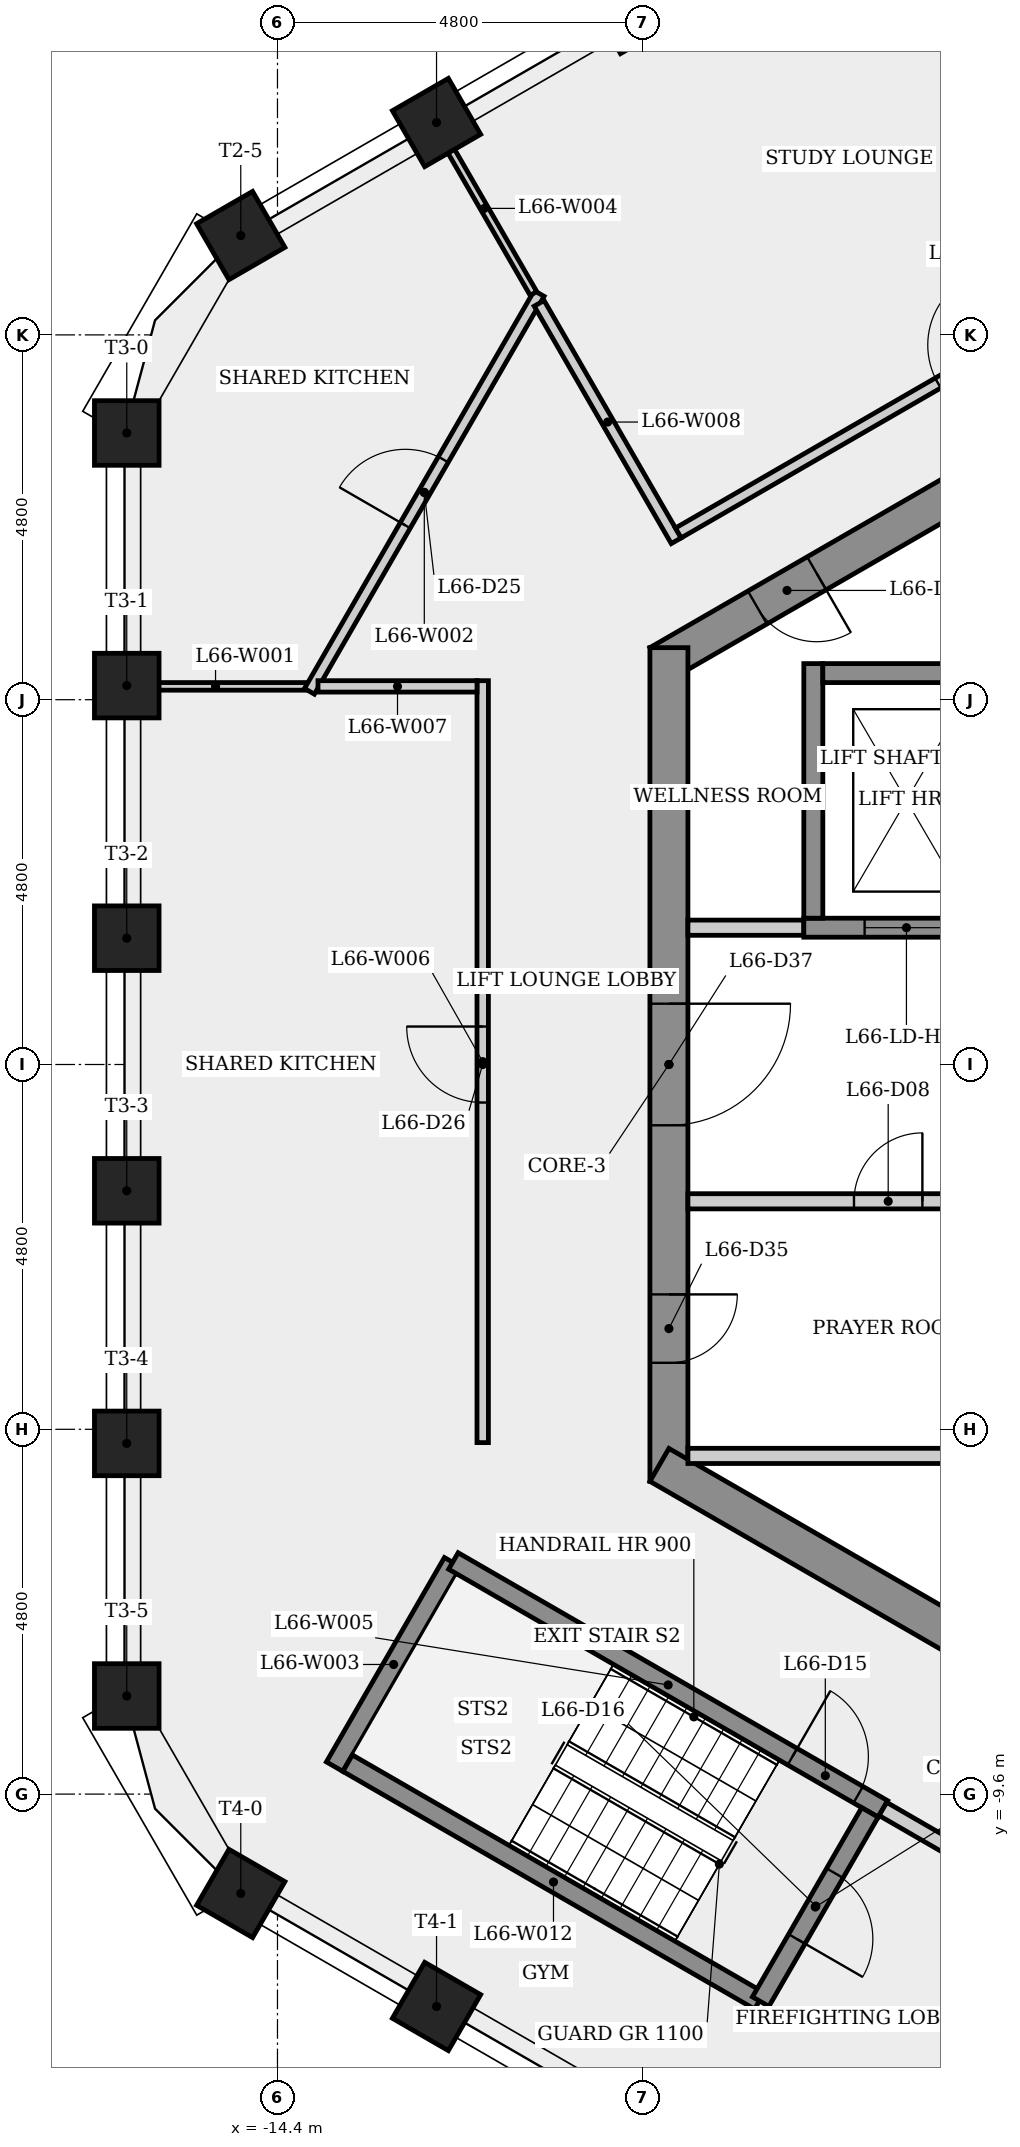
"""IFC4 building model, lengths in metres.
Left out: names, types, materials, properties, quantities, classifications, styles, units other than length and angle.
Written with IfcOpenShell. Run it as: python <this file> out.ifc"""

import sys

from ifc_helpers import new_model, si_unit, direction, frame, frame_2d, origin, origin_2d, place, context, subcontext, project, spatial, rectangle, extrude, element, fill, save


model = new_model("IFC4")
c1 = context("Model", 3, precision=1e-05, world=origin(), true_north=direction((0.0, 1.0)))
c2 = subcontext(c1, "Body", "Model", "MODEL_VIEW")
j1 = project(units=[si_unit("LENGTHUNIT", "METRE"), si_unit("PLANEANGLEUNIT", "RADIAN")], contexts=[c1])
p1 = place(None, origin())
s1 = spatial("IfcSite", under=j1, at=p1, CompositionType="ELEMENT")
p2 = place(p1, origin())
s2 = spatial("IfcBuilding", under=s1, at=p2, CompositionType="ELEMENT")
p3 = place(p2, frame((0.0, 0.0, 246.1)))
s3 = spatial("IfcBuildingStorey", under=s2, at=p3, CompositionType="ELEMENT", Elevation=246.1)
p4 = place(p3, frame((0.125, 10.753, 0.0), z_axis=(0.0, 0.0, 1.0), x_axis=(-0.866023993627, -0.500002442456, 0.0)))
e1 = element("IfcWall", 1, at=p4, inside=s3, PredefinedType="SHEAR", context=c2, shape_type="SweptSolid", body=[
    extrude(rectangle(XDim=10.97, YDim=0.5, at=frame_2d((5.485, 0.0))), origin(), (0.0, 0.0, 1.0), 3.4),
])
p5 = place(p4, frame((8.581, 0.0, 0.0)))
e2 = element("IfcOpeningElement", 2, at=p5, cuts=e1, PredefinedType="OPENING", context=c2, shape_type="SweptSolid", body=[
    extrude(rectangle(XDim=0.9, YDim=2.1, at=frame_2d((0.45, 1.05))), frame((0.0, 0.26, 0.0), z_axis=(0.0, -1.0, 0.0), x_axis=(1.0, 0.0, 0.0)), (0.0, 0.0, 1.0), 0.52),
])
p6 = place(p4, frame((1.687, 0.0, 0.0)))
e3 = element("IfcOpeningElement", 3, at=p6, cuts=e1, PredefinedType="OPENING", context=c2, shape_type="SweptSolid", body=[
    extrude(rectangle(XDim=0.9, YDim=2.1, at=frame_2d((0.45, 1.05))), frame((0.0, 0.26, 0.0), z_axis=(0.0, -1.0, 0.0), x_axis=(1.0, 0.0, 0.0)), (0.0, 0.0, 1.0), 0.52),
])
p7 = place(p3, frame((-9.25, 5.485, 0.0), z_axis=(0.0, 0.0, 1.0), x_axis=(0.0, -1.0, 0.0)))
e4 = element("IfcWall", 4, at=p7, inside=s3, PredefinedType="SHEAR", context=c2, shape_type="SweptSolid", body=[
    extrude(rectangle(XDim=10.97, YDim=0.5, at=frame_2d((5.485, 0.0))), origin(), (0.0, 0.0, 1.0), 3.4),
])
p8 = place(p7, frame((8.51, 0.0, 0.0)))
e5 = element("IfcOpeningElement", 5, at=p8, cuts=e4, PredefinedType="OPENING", context=c2, shape_type="SweptSolid", body=[
    extrude(rectangle(XDim=0.9, YDim=2.1, at=frame_2d((0.45, 1.05))), frame((0.0, 0.26, 0.0), z_axis=(0.0, -1.0, 0.0), x_axis=(1.0, 0.0, 0.0)), (0.0, 0.0, 1.0), 0.52),
])
p9 = place(p7, frame((4.685, 0.0, 0.0)))
e6 = element("IfcOpeningElement", 6, at=p9, cuts=e4, PredefinedType="OPENING", context=c2, shape_type="SweptSolid", body=[
    extrude(rectangle(XDim=1.6, YDim=2.1, at=frame_2d((0.8, 1.05))), frame((0.0, 0.26, 0.0), z_axis=(0.0, -1.0, 0.0), x_axis=(1.0, 0.0, 0.0)), (0.0, 0.0, 1.0), 0.52),
])
p10 = place(p3, frame((-9.375, -5.268, 0.0), z_axis=(0.0, 0.0, 1.0), x_axis=(0.866023993627, -0.500002442456, 0.0)))
e7 = element("IfcWall", 7, at=p10, inside=s3, PredefinedType="SHEAR", context=c2, shape_type="SweptSolid", body=[
    extrude(rectangle(XDim=10.97, YDim=0.5, at=frame_2d((5.485, 0.0))), origin(), (0.0, 0.0, 1.0), 3.4),
])
p11 = place(p10, frame((5.011, 0.0, 0.0)))
e8 = element("IfcOpeningElement", 8, at=p11, cuts=e7, PredefinedType="OPENING", context=c2, shape_type="SweptSolid", body=[
    extrude(rectangle(XDim=0.9, YDim=2.1, at=frame_2d((0.45, 1.05))), frame((0.0, 0.26, 0.0), z_axis=(0.0, -1.0, 0.0), x_axis=(1.0, 0.0, 0.0)), (0.0, 0.0, 1.0), 0.52),
])
for number, where, z_axis, x_axis in (
    (9, (-9.732, 13.881, 0.0), (0.0, 0.0, 1.0), (-0.5, 0.866, 0.0)),
    (10, (-12.307, 12.394, 0.0), (0.0, 0.0, 1.0), (-0.5, 0.866, 0.0)),
    (11, (-14.883, 10.907, 0.0), (0.0, 0.0, 1.0), (-0.5, 0.866, 0.0)),
    (12, (-16.383, 8.309, 0.0), (0.0, 0.0, 1.0), (-1.0, 0.0, 0.0)),
    (13, (-16.383, 4.986, 0.0), (0.0, 0.0, 1.0), (-1.0, 0.0, 0.0)),
    (14, (-16.383, 1.662, 0.0), (0.0, 0.0, 1.0), (-1.0, 0.0, 0.0)),
    (15, (-16.383, -1.662, 0.0), (0.0, 0.0, 1.0), (-1.0, 0.0, 0.0)),
    (16, (-16.383, -4.986, 0.0), (0.0, 0.0, 1.0), (-1.0, 0.0, 0.0)),
    (17, (-16.383, -8.309, 0.0), (0.0, 0.0, 1.0), (-1.0, 0.0, 0.0)),
    (18, (-14.883, -10.907, 0.0), (0.0, 0.0, 1.0), (-0.5, -0.866, 0.0)),
    (19, (-12.307, -12.394, 0.0), (0.0, 0.0, 1.0), (-0.5, -0.866, 0.0)),
):
    element("IfcColumn", number, at=place(p3, frame(where, z_axis=z_axis, x_axis=x_axis)), inside=s3, PredefinedType="COLUMN", context=c2, shape_type="SweptSolid", body=[
        extrude(rectangle(XDim=0.85, YDim=0.85, at=origin_2d()), origin(), (0.0, 0.0, 1.0), 3.4),
    ])
p12 = place(p3, frame((-14.017, 4.975, 0.0), z_axis=(0.0, 0.0, 1.0), x_axis=(-1.0, 0.0, 0.0)))
e20 = element("IfcWall", 20, at=p12, inside=s3, PredefinedType="PARTITIONING", context=c2, shape_type="SweptSolid", body=[
    extrude(rectangle(XDim=2.396, YDim=0.1, at=frame_2d((1.198, 0.0))), origin(), (0.0, 0.0, 1.0), 3.05),
])
p13 = place(p3, frame((-13.979, 4.91, 0.0), z_axis=(0.0, 0.0, 1.0), x_axis=(0.500000995992, 0.866024828747, 0.0)))
e21 = element("IfcWall", 21, at=p13, inside=s3, PredefinedType="PARTITIONING", context=c2, shape_type="SweptSolid", body=[
    extrude(rectangle(XDim=6.044, YDim=0.15, at=frame_2d((3.022, 0.0))), origin(), (0.0, 0.0, 1.0), 3.05),
])
p14 = place(p13, frame((2.522, 0.0, 0.0)))
e22 = element("IfcOpeningElement", 22, at=p14, cuts=e21, PredefinedType="OPENING", context=c2, shape_type="SweptSolid", body=[
    extrude(rectangle(XDim=1.0, YDim=2.1, at=frame_2d((0.5, 1.05))), frame((0.0, 0.085, 0.0), z_axis=(0.0, -1.0, 0.0), x_axis=(1.0, 0.0, 0.0)), (0.0, 0.0, 1.0), 0.17),
])
p15 = place(p3, frame((-13.648, -9.239, 0.0), z_axis=(0.0, 0.0, 1.0), x_axis=(0.500003782172, 0.866023220135, 0.0)))
e23 = element("IfcWall", 23, at=p15, inside=s3, PredefinedType="SHEAR", context=c2, shape_type="SweptSolid", body=[
    extrude(rectangle(XDim=3.105, YDim=0.25, at=frame_2d((1.552, 0.0))), origin(), (0.0, 0.0, 1.0), 3.05),
])
p16 = place(p3, frame((-12.325, 12.384, 0.0), z_axis=(0.0, 0.0, 1.0), x_axis=(0.500079363871, -0.865979578183, 0.0)))
e24 = element("IfcWall", 24, at=p16, inside=s3, PredefinedType="PARTITIONING", context=c2, shape_type="SweptSolid", body=[
    extrude(rectangle(XDim=2.585, YDim=0.1, at=frame_2d((1.293, 0.0))), origin(), (0.0, 0.0, 1.0), 3.05),
])
p17 = place(p3, frame((-12.085, -6.532, 0.0), z_axis=(0.0, 0.0, 1.0), x_axis=(0.866031063448, -0.499990197047, 0.0)))
e25 = element("IfcWall", 25, at=p17, inside=s3, PredefinedType="SHEAR", context=c2, shape_type="SweptSolid", body=[
    extrude(rectangle(XDim=6.525, YDim=0.25, at=frame_2d((3.263, 0.0))), origin(), (0.0, 0.0, 1.0), 3.05),
])
p18 = place(p17, frame((5.15, 0.0, 0.0)))
e26 = element("IfcOpeningElement", 26, at=p18, cuts=e25, PredefinedType="OPENING", context=c2, shape_type="SweptSolid", body=[
    extrude(rectangle(XDim=1.0, YDim=2.1, at=frame_2d((0.5, 1.05))), frame((0.0, 0.135, 0.0), z_axis=(0.0, -1.0, 0.0), x_axis=(1.0, 0.0, 0.0)), (0.0, 0.0, 1.0), 0.27),
])
p19 = place(p3, frame((-11.7, -4.975, 0.0), z_axis=(0.0, 0.0, 1.0), x_axis=(0.0, 1.0, 0.0)))
e27 = element("IfcWall", 27, at=p19, inside=s3, PredefinedType="PARTITIONING", context=c2, shape_type="SweptSolid", body=[
    extrude(rectangle(XDim=10.025, YDim=0.15, at=frame_2d((5.013, 0.0))), origin(), (0.0, 0.0, 1.0), 3.05),
])
p20 = place(p19, frame((4.475, 0.0, 0.0)))
e28 = element("IfcOpeningElement", 28, at=p20, cuts=e27, PredefinedType="OPENING", context=c2, shape_type="SweptSolid", body=[
    extrude(rectangle(XDim=1.0, YDim=2.1, at=frame_2d((0.5, 1.05))), frame((0.0, 0.085, 0.0), z_axis=(0.0, -1.0, 0.0), x_axis=(1.0, 0.0, 0.0)), (0.0, 0.0, 1.0), 0.17),
])
p21 = place(p3, frame((-11.775, 4.975, 0.0), z_axis=(0.0, 0.0, 1.0), x_axis=(-1.0, 0.0, 0.0)))
e29 = element("IfcWall", 29, at=p21, inside=s3, PredefinedType="PARTITIONING", context=c2, shape_type="SweptSolid", body=[
    extrude(rectangle(XDim=2.092, YDim=0.15, at=frame_2d((1.046, 0.0))), origin(), (0.0, 0.0, 1.0), 3.05),
])
p22 = place(p3, frame((-10.957, 10.015, 0.0), z_axis=(0.0, 0.0, 1.0), x_axis=(0.500019324569, -0.866014246452, 0.0)))
e30 = element("IfcWall", 30, at=p22, inside=s3, PredefinedType="PARTITIONING", context=c2, shape_type="SweptSolid", body=[
    extrude(rectangle(XDim=3.607, YDim=0.15, at=frame_2d((1.803, 0.0))), origin(), (0.0, 0.0, 1.0), 3.05),
])
p23 = place(p3, frame((-9.126, 6.994, 0.0), z_axis=(0.0, 0.0, 1.0), x_axis=(0.866030533695, 0.499991114629, 0.0)))
e31 = element("IfcWall", 31, at=p23, inside=s3, PredefinedType="PARTITIONING", context=c2, shape_type="SweptSolid", body=[
    extrude(rectangle(XDim=8.889, YDim=0.15, at=frame_2d((4.444, 0.0))), origin(), (0.0, 0.0, 1.0), 3.05),
])
p24 = place(p23, frame((3.944, 0.0, 0.0)))
e32 = element("IfcOpeningElement", 32, at=p24, cuts=e31, PredefinedType="OPENING", context=c2, shape_type="SweptSolid", body=[
    extrude(rectangle(XDim=1.0, YDim=2.1, at=frame_2d((0.5, 1.05))), frame((0.0, 0.085, 0.0), z_axis=(0.0, -1.0, 0.0), x_axis=(1.0, 0.0, 0.0)), (0.0, 0.0, 1.0), 0.17),
])
p25 = place(p3, frame((-9.0, 1.8, 0.0), z_axis=(0.0, 0.0, 1.0), x_axis=(1.0, 0.0, 0.0)))
e33 = element("IfcWall", 33, at=p25, inside=s3, PredefinedType="PARTITIONING", context=c2, shape_type="SweptSolid", body=[
    extrude(rectangle(XDim=1.525, YDim=0.2, at=frame_2d((0.763, 0.0))), origin(), (0.0, 0.0, 1.0), 3.05),
])
p26 = place(p3, frame((-9.0, -5.15, 0.0), z_axis=(0.0, 0.0, 1.0), x_axis=(1.0, 0.0, 0.0)))
e34 = element("IfcWall", 34, at=p26, inside=s3, PredefinedType="PARTITIONING", context=c2, shape_type="SweptSolid", body=[
    extrude(rectangle(XDim=11.325, YDim=0.2, at=frame_2d((5.663, 0.0))), origin(), (0.0, 0.0, 1.0), 3.05),
])
p27 = place(p3, frame((-8.06, -12.321, 0.0), z_axis=(0.0, 0.0, 1.0), x_axis=(-0.866029591389, 0.499992746786, 0.0)))
e35 = element("IfcWall", 35, at=p27, inside=s3, PredefinedType="SHEAR", context=c2, shape_type="SweptSolid", body=[
    extrude(rectangle(XDim=6.255, YDim=0.25, at=frame_2d((3.127, 0.0))), origin(), (0.0, 0.0, 1.0), 3.05),
])
p28 = place(p3, frame((-7.475, 1.8, 0.0), z_axis=(0.0, 0.0, 1.0), x_axis=(1.0, 0.0, 0.0)))
e36 = element("IfcWall", 36, at=p28, inside=s3, PredefinedType="SHEAR", context=c2, shape_type="SweptSolid", body=[
    extrude(rectangle(XDim=14.95, YDim=0.25, at=frame_2d((7.475, 0.0))), origin(), (0.0, 0.0, 1.0), 3.05),
])
p29 = place(p28, frame((0.8, 0.0, 0.0)))
e37 = element("IfcOpeningElement", 37, at=p29, cuts=e36, PredefinedType="OPENING", context=c2, shape_type="SweptSolid", body=[
    extrude(rectangle(XDim=1.1, YDim=2.1, at=frame_2d((0.55, 1.05))), frame((0.0, 0.135, 0.0), z_axis=(0.0, -1.0, 0.0), x_axis=(1.0, 0.0, 0.0)), (0.0, 0.0, 1.0), 0.27),
])
p30 = place(p28, frame((3.25, 0.0, 0.0)))
e38 = element("IfcOpeningElement", 38, at=p30, cuts=e36, PredefinedType="OPENING", context=c2, shape_type="SweptSolid", body=[
    extrude(rectangle(XDim=1.1, YDim=2.1, at=frame_2d((0.55, 1.05))), frame((0.0, 0.135, 0.0), z_axis=(0.0, -1.0, 0.0), x_axis=(1.0, 0.0, 0.0)), (0.0, 0.0, 1.0), 0.27),
])
p31 = place(p28, frame((5.7, 0.0, 0.0)))
e39 = element("IfcOpeningElement", 39, at=p31, cuts=e36, PredefinedType="OPENING", context=c2, shape_type="SweptSolid", body=[
    extrude(rectangle(XDim=1.1, YDim=2.1, at=frame_2d((0.55, 1.05))), frame((0.0, 0.135, 0.0), z_axis=(0.0, -1.0, 0.0), x_axis=(1.0, 0.0, 0.0)), (0.0, 0.0, 1.0), 0.27),
])
p32 = place(p28, frame((8.15, 0.0, 0.0)))
e40 = element("IfcOpeningElement", 40, at=p32, cuts=e36, PredefinedType="OPENING", context=c2, shape_type="SweptSolid", body=[
    extrude(rectangle(XDim=1.1, YDim=2.1, at=frame_2d((0.55, 1.05))), frame((0.0, 0.135, 0.0), z_axis=(0.0, -1.0, 0.0), x_axis=(1.0, 0.0, 0.0)), (0.0, 0.0, 1.0), 0.27),
])
p33 = place(p28, frame((10.6, 0.0, 0.0)))
e41 = element("IfcOpeningElement", 41, at=p33, cuts=e36, PredefinedType="OPENING", context=c2, shape_type="SweptSolid", body=[
    extrude(rectangle(XDim=1.1, YDim=2.1, at=frame_2d((0.55, 1.05))), frame((0.0, 0.135, 0.0), z_axis=(0.0, -1.0, 0.0), x_axis=(1.0, 0.0, 0.0)), (0.0, 0.0, 1.0), 0.27),
])
p34 = place(p28, frame((13.05, 0.0, 0.0)))
e42 = element("IfcOpeningElement", 42, at=p34, cuts=e36, PredefinedType="OPENING", context=c2, shape_type="SweptSolid", body=[
    extrude(rectangle(XDim=1.1, YDim=2.1, at=frame_2d((0.55, 1.05))), frame((0.0, 0.135, 0.0), z_axis=(0.0, -1.0, 0.0), x_axis=(1.0, 0.0, 0.0)), (0.0, 0.0, 1.0), 0.27),
])
p35 = place(p3, frame((-7.35, 1.925, 0.0), z_axis=(0.0, 0.0, 1.0), x_axis=(0.0, 1.0, 0.0)))
e43 = element("IfcWall", 43, at=p35, inside=s3, PredefinedType="SHEAR", context=c2, shape_type="SweptSolid", body=[
    extrude(rectangle(XDim=3.35, YDim=0.25, at=frame_2d((1.675, 0.0))), origin(), (0.0, 0.0, 1.0), 3.05),
])
p36 = place(p3, frame((-7.225, 5.15, 0.0), z_axis=(0.0, 0.0, 1.0), x_axis=(1.0, 0.0, 0.0)))
e44 = element("IfcWall", 44, at=p36, inside=s3, PredefinedType="SHEAR", context=c2, shape_type="SweptSolid", body=[
    extrude(rectangle(XDim=14.7, YDim=0.25, at=frame_2d((7.35, 0.0))), origin(), (0.0, 0.0, 1.0), 3.05),
])
p37 = place(p3, frame((-6.605, -9.841, 0.0), z_axis=(0.0, 0.0, 1.0), x_axis=(-0.500011588718, -0.866018712932, 0.0)))
e45 = element("IfcWall", 45, at=p37, inside=s3, PredefinedType="SHEAR", context=c2, shape_type="SweptSolid", body=[
    extrude(rectangle(XDim=2.875, YDim=0.25, at=frame_2d((1.438, 0.0))), origin(), (0.0, 0.0, 1.0), 3.05),
])
p38 = place(p37, frame((0.923, 0.0, 0.0)))
e46 = element("IfcOpeningElement", 46, at=p38, cuts=e45, PredefinedType="OPENING", context=c2, shape_type="SweptSolid", body=[
    extrude(rectangle(XDim=1.0, YDim=2.1, at=frame_2d((0.5, 1.05))), frame((0.0, 0.135, 0.0), z_axis=(0.0, -1.0, 0.0), x_axis=(1.0, 0.0, 0.0)), (0.0, 0.0, 1.0), 0.27),
])
p39 = place(p3, frame((-6.435, -9.795, 0.0), z_axis=(0.0, 0.0, 1.0), x_axis=(0.866012907634, -0.500021643343, 0.0)))
e47 = element("IfcWall", 47, at=p39, inside=s3, PredefinedType="PARTITIONING", context=c2, shape_type="SweptSolid", body=[
    extrude(rectangle(XDim=4.45, YDim=0.2, at=frame_2d((2.225, 0.0))), origin(), (0.0, 0.0, 1.0), 3.05),
])
p40 = place(p39, frame((1.675, 0.0, 0.0)))
e48 = element("IfcOpeningElement", 48, at=p40, cuts=e47, PredefinedType="OPENING", context=c2, shape_type="SweptSolid", body=[
    extrude(rectangle(XDim=1.1, YDim=2.1, at=frame_2d((0.55, 1.05))), frame((0.0, 0.11, 0.0), z_axis=(0.0, -1.0, 0.0), x_axis=(1.0, 0.0, 0.0)), (0.0, 0.0, 1.0), 0.22),
])
p41 = place(p3, frame((-9.0, -1.8, 0.0), z_axis=(0.0, 0.0, 1.0), x_axis=(1.0, 0.0, 0.0)))
e49 = element("IfcWall", 49, at=p41, inside=s3, PredefinedType="PARTITIONING", context=c2, shape_type="SweptSolid", body=[
    extrude(rectangle(XDim=11.325, YDim=0.2, at=frame_2d((5.663, 0.0))), origin(), (0.0, 0.0, 1.0), 3.05),
])
p42 = place(p41, frame((2.185, 0.0, 0.0)))
e50 = element("IfcOpeningElement", 50, at=p42, cuts=e49, PredefinedType="OPENING", context=c2, shape_type="SweptSolid", body=[
    extrude(rectangle(XDim=0.9, YDim=2.1, at=frame_2d((0.45, 1.05))), frame((0.0, 0.11, 0.0), z_axis=(0.0, -1.0, 0.0), x_axis=(1.0, 0.0, 0.0)), (0.0, 0.0, 1.0), 0.22),
])
p43 = place(p41, frame((6.71, 0.0, 0.0)))
e51 = element("IfcOpeningElement", 51, at=p43, cuts=e49, PredefinedType="OPENING", context=c2, shape_type="SweptSolid", body=[
    extrude(rectangle(XDim=0.9, YDim=2.1, at=frame_2d((0.45, 1.05))), frame((0.0, 0.11, 0.0), z_axis=(0.0, -1.0, 0.0), x_axis=(1.0, 0.0, 0.0)), (0.0, 0.0, 1.0), 0.22),
])
p44 = place(p41, frame((9.713, 0.0, 0.0)))
e52 = element("IfcOpeningElement", 52, at=p44, cuts=e49, PredefinedType="OPENING", context=c2, shape_type="SweptSolid", body=[
    extrude(rectangle(XDim=0.9, YDim=2.1, at=frame_2d((0.45, 1.05))), frame((0.0, 0.11, 0.0), z_axis=(0.0, -1.0, 0.0), x_axis=(1.0, 0.0, 0.0)), (0.0, 0.0, 1.0), 0.22),
])
p45 = place(p29, origin())
e53 = element("IfcDoor", 53, at=p45, inside=s3, OperationType="SLIDING_TO_LEFT", PredefinedType="DOOR", context=c2, shape_type="SweptSolid", body=[
    extrude(rectangle(XDim=1.1, YDim=2.1, at=frame_2d((0.55, 1.05))), frame((0.0, 0.025, 0.0), z_axis=(0.0, -1.0, 0.0), x_axis=(1.0, 0.0, 0.0)), (0.0, 0.0, 1.0), 0.05),
])
fill(e37, e53)
p46 = place(p42, origin())
e54 = element("IfcDoor", 54, at=p46, inside=s3, OperationType="SINGLE_SWING_RIGHT", PredefinedType="DOOR", context=c2, shape_type="SweptSolid", body=[
    extrude(rectangle(XDim=0.9, YDim=2.1, at=frame_2d((0.45, 1.05))), frame((0.0, 0.025, 0.0), z_axis=(0.0, -1.0, 0.0), x_axis=(1.0, 0.0, 0.0)), (0.0, 0.0, 1.0), 0.05),
])
fill(e50, e54)
p47 = place(p18, origin())
e55 = element("IfcDoor", 55, at=p47, inside=s3, OperationType="SINGLE_SWING_LEFT", PredefinedType="DOOR", context=c2, shape_type="SweptSolid", body=[
    extrude(rectangle(XDim=1.0, YDim=2.1, at=frame_2d((0.5, 1.05))), frame((0.0, 0.025, 0.0), z_axis=(0.0, -1.0, 0.0), x_axis=(1.0, 0.0, 0.0)), (0.0, 0.0, 1.0), 0.05),
])
fill(e26, e55)
p48 = place(p38, origin())
e56 = element("IfcDoor", 56, at=p48, inside=s3, OperationType="SINGLE_SWING_RIGHT", PredefinedType="DOOR", context=c2, shape_type="SweptSolid", body=[
    extrude(rectangle(XDim=1.0, YDim=2.1, at=frame_2d((0.5, 1.05))), frame((0.0, 0.025, 0.0), z_axis=(0.0, -1.0, 0.0), x_axis=(1.0, 0.0, 0.0)), (0.0, 0.0, 1.0), 0.05),
])
fill(e46, e56)
p49 = place(p14, origin())
e57 = element("IfcDoor", 57, at=p49, inside=s3, OperationType="SINGLE_SWING_LEFT", PredefinedType="DOOR", context=c2, shape_type="SweptSolid", body=[
    extrude(rectangle(XDim=1.0, YDim=2.1, at=frame_2d((0.5, 1.05))), frame((0.0, 0.025, 0.0), z_axis=(0.0, -1.0, 0.0), x_axis=(1.0, 0.0, 0.0)), (0.0, 0.0, 1.0), 0.05),
])
fill(e22, e57)
p50 = place(p20, origin())
e58 = element("IfcDoor", 58, at=p50, inside=s3, OperationType="SINGLE_SWING_RIGHT", PredefinedType="DOOR", context=c2, shape_type="SweptSolid", body=[
    extrude(rectangle(XDim=1.0, YDim=2.1, at=frame_2d((0.5, 1.05))), frame((0.0, 0.025, 0.0), z_axis=(0.0, -1.0, 0.0), x_axis=(1.0, 0.0, 0.0)), (0.0, 0.0, 1.0), 0.05),
])
fill(e28, e58)
p51 = place(p24, origin())
e59 = element("IfcDoor", 59, at=p51, inside=s3, OperationType="SINGLE_SWING_RIGHT", PredefinedType="DOOR", context=c2, shape_type="SweptSolid", body=[
    extrude(rectangle(XDim=1.0, YDim=2.1, at=frame_2d((0.5, 1.05))), frame((0.0, 0.025, 0.0), z_axis=(0.0, -1.0, 0.0), x_axis=(1.0, 0.0, 0.0)), (0.0, 0.0, 1.0), 0.05),
])
fill(e32, e59)
p52 = place(p5, origin())
e60 = element("IfcDoor", 60, at=p52, inside=s3, OperationType="SINGLE_SWING_LEFT", PredefinedType="DOOR", context=c2, shape_type="SweptSolid", body=[
    extrude(rectangle(XDim=0.9, YDim=2.1, at=frame_2d((0.45, 1.05))), frame((0.0, 0.025, 0.0), z_axis=(0.0, -1.0, 0.0), x_axis=(1.0, 0.0, 0.0)), (0.0, 0.0, 1.0), 0.05),
])
fill(e2, e60)
p53 = place(p8, origin())
e61 = element("IfcDoor", 61, at=p53, inside=s3, OperationType="SINGLE_SWING_LEFT", PredefinedType="DOOR", context=c2, shape_type="SweptSolid", body=[
    extrude(rectangle(XDim=0.9, YDim=2.1, at=frame_2d((0.45, 1.05))), frame((0.0, 0.025, 0.0), z_axis=(0.0, -1.0, 0.0), x_axis=(1.0, 0.0, 0.0)), (0.0, 0.0, 1.0), 0.05),
])
fill(e5, e61)
p54 = place(p9, origin())
e62 = element("IfcDoor", 62, at=p54, inside=s3, OperationType="SINGLE_SWING_LEFT", PredefinedType="DOOR", context=c2, shape_type="SweptSolid", body=[
    extrude(rectangle(XDim=1.6, YDim=2.1, at=frame_2d((0.8, 1.05))), frame((0.0, 0.025, 0.0), z_axis=(0.0, -1.0, 0.0), x_axis=(1.0, 0.0, 0.0)), (0.0, 0.0, 1.0), 0.05),
])
fill(e6, e62)
save(model, sys.argv[1])
